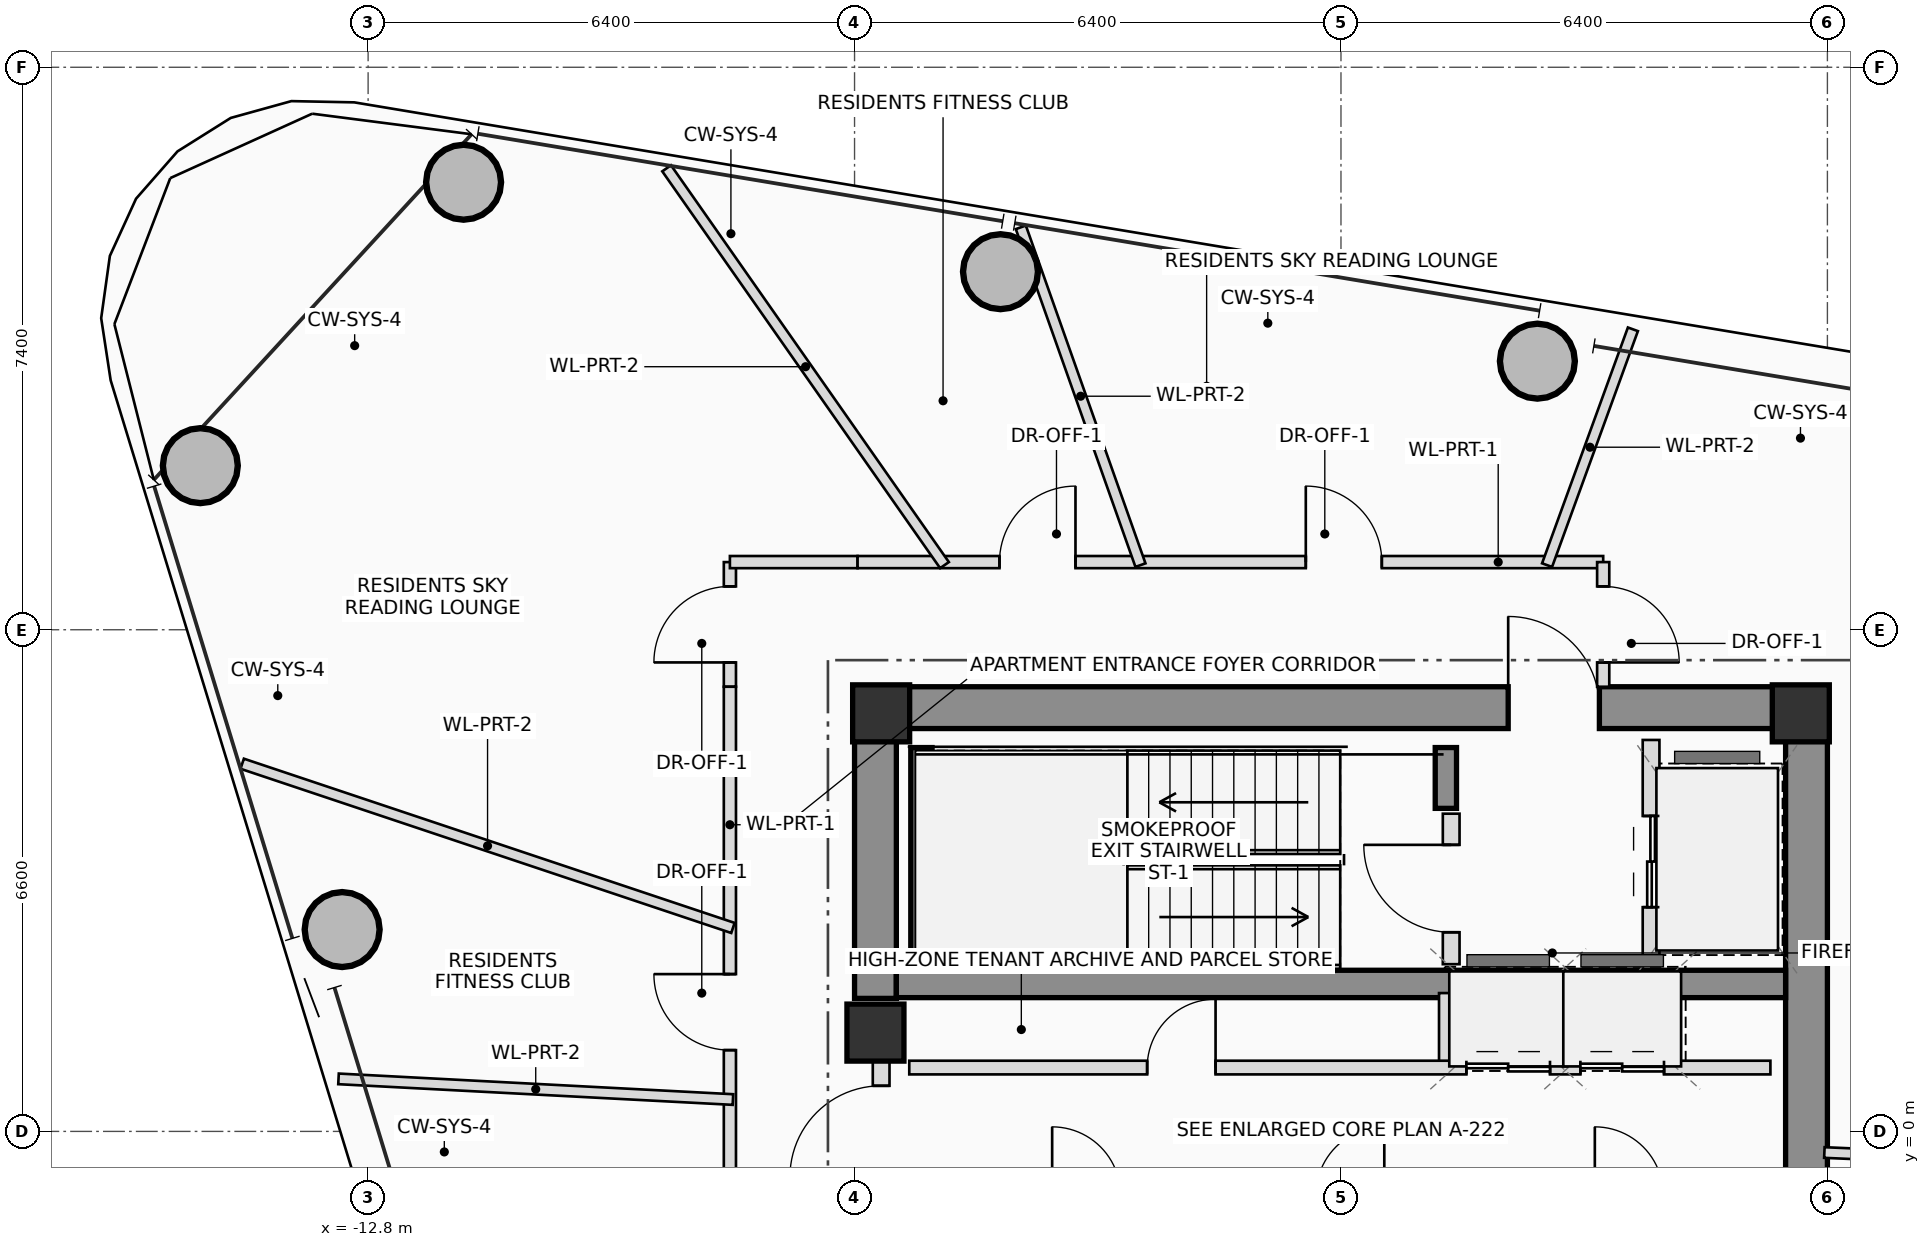
"""IFC4 building model, lengths in metres.
Left out: names, types, materials, properties, quantities, classifications, styles, units other than length and angle.
Written with IfcOpenShell. Run it as: python <this file> out.ifc"""

import sys

from ifc_helpers import new_model, si_unit, direction, frame, frame_2d, origin, origin_2d, place, context, subcontext, project, spatial, rectangle, hollow_circle, extrude, source, transform, mapped, element, fill, save


model = new_model("IFC4")
c1 = context("Model", 3, precision=1e-05, world=origin(), true_north=direction((0.0, 1.0)))
c2 = subcontext(c1, "Body", "Model", "MODEL_VIEW")
j1 = project(units=[si_unit("LENGTHUNIT", "METRE"), si_unit("PLANEANGLEUNIT", "RADIAN")], contexts=[c1])
p1 = place(None, origin())
s1 = spatial("IfcSite", under=j1, at=p1, CompositionType="ELEMENT")
p2 = place(p1, origin())
s2 = spatial("IfcBuilding", under=s1, at=p2, CompositionType="ELEMENT")
p3 = place(p2, frame((0.0, 0.0, 235.45)))
s3 = spatial("IfcBuildingStorey", under=s2, at=p3, CompositionType="ELEMENT", Elevation=235.45)
m1 = source(origin(), c2, "Body", "SweptSolid", [
    extrude(rectangle(XDim=0.75, YDim=0.75, at=origin_2d()), origin(), (0.0, 0.0, 1.0), 3.4),
])
for number, where, z_axis, x_axis in (
    (1, (6.05, 5.5, 0.0), (0.0, 0.0, 1.0), (1.0, 0.0, 0.0)),
    (2, (-6.05, 5.5, 0.0), (0.0, 0.0, 1.0), (1.0, 0.0, 0.0)),
):
    element("IfcColumn", number, at=place(p3, frame(where, z_axis=z_axis, x_axis=x_axis)), inside=s3, PredefinedType="COLUMN", context=c2, shape_type="MappedRepresentation", body=[
        mapped(m1, transform((0.0, 0.0, 0.0), scale=1.0)),
    ])
p4 = place(p3, frame((-6.4, 5.575, 0.0), z_axis=(0.0, 0.0, 1.0), x_axis=(1.0, 0.0, 0.0)))
e3 = element("IfcWall", 3, at=p4, inside=s3, PredefinedType="SHEAR", context=c2, shape_type="SweptSolid", body=[
    extrude(rectangle(XDim=12.8, YDim=0.55, at=frame_2d((6.4, 0.0))), origin(), (0.0, 0.0, 1.0), 3.4),
])
p5 = place(p4, frame((8.6, 0.0, 0.0)))
e4 = element("IfcOpeningElement", 4, at=p5, cuts=e3, PredefinedType="OPENING", context=c2, shape_type="SweptSolid", body=[
    extrude(rectangle(XDim=1.2, YDim=2.2, at=frame_2d((0.6, 1.1))), frame((0.0, 0.285, 0.0), z_axis=(0.0, -1.0, 0.0), x_axis=(1.0, 0.0, 0.0)), (0.0, 0.0, 1.0), 0.57),
])
p6 = place(p3, frame((6.125, -5.3, 0.0), z_axis=(0.0, 0.0, 1.0), x_axis=(0.0, 1.0, 0.0)))
e5 = element("IfcWall", 5, at=p6, inside=s3, PredefinedType="SHEAR", context=c2, shape_type="SweptSolid", body=[
    extrude(rectangle(XDim=10.6, YDim=0.55, at=frame_2d((5.3, 0.0))), origin(), (0.0, 0.0, 1.0), 3.4),
])
p7 = place(p3, frame((-6.125, 1.75, 0.0), z_axis=(0.0, 0.0, 1.0), x_axis=(0.0, 1.0, 0.0)))
e6 = element("IfcWall", 6, at=p7, inside=s3, PredefinedType="SHEAR", context=c2, shape_type="SweptSolid", body=[
    extrude(rectangle(XDim=3.55, YDim=0.55, at=frame_2d((1.775, 0.0))), origin(), (0.0, 0.0, 1.0), 3.4),
])
p8 = place(p3, frame((-5.85, 1.94, 0.0), z_axis=(0.0, 0.0, 1.0), x_axis=(1.0, 0.0, 0.0)))
e7 = element("IfcWall", 7, at=p8, inside=s3, PredefinedType="SHEAR", context=c2, shape_type="SweptSolid", body=[
    extrude(rectangle(XDim=11.7, YDim=0.36, at=frame_2d((5.85, 0.0))), origin(), (0.0, 0.0, 1.0), 3.4),
])
p9 = place(p3, frame((-5.52, 2.3, 0.0), z_axis=(0.0, 0.0, 1.0), x_axis=(0.0, 1.0, 0.0)))
e8 = element("IfcWall", 8, at=p9, inside=s3, PredefinedType="SHEAR", context=c2, shape_type="SweptSolid", body=[
    extrude(rectangle(XDim=2.75, YDim=0.28, at=frame_2d((1.375, 0.0))), origin(), (0.0, 0.0, 1.0), 3.4),
])
p10 = place(p3, frame((1.38, 4.25, 0.0), z_axis=(0.0, 0.0, 1.0), x_axis=(0.0, 1.0, 0.0)))
e9 = element("IfcWall", 9, at=p10, inside=s3, PredefinedType="SHEAR", context=c2, shape_type="SweptSolid", body=[
    extrude(rectangle(XDim=0.8, YDim=0.28, at=frame_2d((0.4, 0.0))), origin(), (0.0, 0.0, 1.0), 3.4),
])
p11 = place(p3, frame((-6.125, 1.3, 0.0), z_axis=(0.0, 0.0, 1.0), x_axis=(1.0, 0.0, 0.0)))
e10 = element("IfcColumn", 10, at=p11, inside=s3, PredefinedType="COLUMN", context=c2, shape_type="MappedRepresentation", body=[
    mapped(m1, transform((0.0, 0.0, 0.0), scale=1.0)),
])
m2 = source(origin(), c2, "Body", "SweptSolid", [
    extrude(hollow_circle(Radius=0.5, WallThickness=0.04, at=origin_2d()), origin(), (0.0, 0.0, 1.0), 3.4),
])
for number, where, z_axis, x_axis in (
    (11, (2.584, 10.134, 0.0), (0.0, 0.0, 1.0), (1.0, 0.0, 0.0)),
    (12, (-4.48, 11.311, 0.0), (0.0, 0.0, 1.0), (1.0, 0.0, 0.0)),
    (13, (-11.544, 12.488, 0.0), (0.0, 0.0, 1.0), (1.0, 0.0, 0.0)),
    (14, (-15.008, 8.759, 0.0), (0.0, 0.0, 1.0), (1.0, 0.0, 0.0)),
    (15, (-13.142, 2.656, 0.0), (0.0, 0.0, 1.0), (1.0, 0.0, 0.0)),
):
    element("IfcColumn", number, at=place(p3, frame(where, z_axis=z_axis, x_axis=x_axis)), inside=s3, PredefinedType="COLUMN", context=c2, shape_type="MappedRepresentation", body=[
        mapped(m2, transform((0.0, 0.0, 0.0), scale=1.0)),
    ])
p12 = place(p3, frame((-6.05, -0.95, 0.0), z_axis=(0.0, 0.0, 1.0), x_axis=(0.0, 1.0, 0.0)))
e16 = element("IfcWall", 16, at=p12, inside=s3, PredefinedType="PLUMBINGWALL", context=c2, shape_type="SweptSolid", body=[
    extrude(rectangle(XDim=1.9, YDim=0.22, at=frame_2d((0.95, 0.0))), origin(), (0.0, 0.0, 1.0), 2.18),
])
p13 = place(p12, frame((0.35, 0.0, 0.0)))
e17 = element("IfcOpeningElement", 17, at=p13, cuts=e16, PredefinedType="OPENING", context=c2, shape_type="SweptSolid", body=[
    extrude(rectangle(XDim=1.2, YDim=2.2, at=frame_2d((0.6, 1.1))), frame((0.0, 0.12, 0.0), z_axis=(0.0, -1.0, 0.0), x_axis=(1.0, 0.0, 0.0)), (0.0, 0.0, 1.0), 0.24),
])
p14 = place(p3, frame((1.45, 2.2, 0.0), z_axis=(0.0, 0.0, 1.0), x_axis=(0.0, 1.0, 0.0)))
e18 = element("IfcWall", 18, at=p14, inside=s3, PredefinedType="PLUMBINGWALL", context=c2, shape_type="SweptSolid", body=[
    extrude(rectangle(XDim=1.98, YDim=0.22, at=frame_2d((0.99, 0.0))), origin(), (0.0, 0.0, 1.0), 3.2),
])
p15 = place(p14, frame((0.42, 0.0, 0.0)))
e19 = element("IfcOpeningElement", 19, at=p15, cuts=e18, PredefinedType="OPENING", context=c2, shape_type="SweptSolid", body=[
    extrude(rectangle(XDim=1.15, YDim=2.15, at=frame_2d((0.575, 1.075))), frame((0.0, 0.12, 0.0), z_axis=(0.0, -1.0, 0.0), x_axis=(1.0, 0.0, 0.0)), (0.0, 0.0, 1.0), 0.24),
])
p16 = place(p3, frame((4.08, 2.2, 0.0), z_axis=(0.0, 0.0, 1.0), x_axis=(0.0, 1.0, 0.0)))
e20 = element("IfcWall", 20, at=p16, inside=s3, PredefinedType="PLUMBINGWALL", context=c2, shape_type="SweptSolid", body=[
    extrude(rectangle(XDim=2.95, YDim=0.22, at=frame_2d((1.475, 0.0))), origin(), (0.0, 0.0, 1.0), 3.2),
])
p17 = place(p16, frame((0.75, 0.0, 0.0)))
e21 = element("IfcOpeningElement", 21, at=p17, cuts=e20, PredefinedType="OPENING", context=c2, shape_type="SweptSolid", body=[
    extrude(rectangle(XDim=1.2, YDim=2.25, at=frame_2d((0.6, 1.125))), frame((0.0, 0.12, 0.0), z_axis=(0.0, -1.0, 0.0), x_axis=(1.0, 0.0, 0.0)), (0.0, 0.0, 1.0), 0.24),
])
for number, where, z_axis, x_axis in (
    (22, (1.38, 0.84, 0.0), (0.0, 0.0, 1.0), (0.0, 1.0, 0.0)),
    (23, (3.02, 0.84, 0.0), (0.0, 0.0, 1.0), (0.0, 1.0, 0.0)),
    (24, (4.38, 0.84, 0.0), (0.0, 0.0, 1.0), (0.0, 1.0, 0.0)),
):
    element("IfcWall", number, at=place(p3, frame(where, z_axis=z_axis, x_axis=x_axis)), inside=s3, PredefinedType="PLUMBINGWALL", context=c2, shape_type="SweptSolid", body=[
        extrude(rectangle(XDim=0.98, YDim=0.18, at=frame_2d((0.49, 0.0))), origin(), (0.0, 0.0, 1.0), 3.2),
    ])
p18 = place(p3, frame((-5.68, 0.84, 0.0), z_axis=(0.0, 0.0, 1.0), x_axis=(1.0, 0.0, 0.0)))
e25 = element("IfcWall", 25, at=p18, inside=s3, PredefinedType="PLUMBINGWALL", context=c2, shape_type="SweptSolid", body=[
    extrude(rectangle(XDim=11.33, YDim=0.18, at=frame_2d((5.665, 0.0))), origin(), (0.0, 0.0, 1.0), 3.2),
])
p19 = place(p18, frame((3.13, 0.0, 0.0)))
e26 = element("IfcOpeningElement", 26, at=p19, cuts=e25, PredefinedType="OPENING", context=c2, shape_type="SweptSolid", body=[
    extrude(rectangle(XDim=0.9, YDim=2.05, at=frame_2d((0.45, 1.025))), frame((0.0, 0.1, 0.0), z_axis=(0.0, -1.0, 0.0), x_axis=(1.0, 0.0, 0.0)), (0.0, 0.0, 1.0), 0.2),
])
p20 = place(p18, frame((7.33, 0.0, 0.0)))
e27 = element("IfcOpeningElement", 27, at=p20, cuts=e25, PredefinedType="OPENING", context=c2, shape_type="SweptSolid", body=[
    extrude(rectangle(XDim=1.1, YDim=2.2, at=frame_2d((0.55, 1.1))), frame((0.0, 0.1, 0.0), z_axis=(0.0, -1.0, 0.0), x_axis=(1.0, 0.0, 0.0)), (0.0, 0.0, 1.0), 0.2),
])
p21 = place(p18, frame((8.83, 0.0, 0.0)))
e28 = element("IfcOpeningElement", 28, at=p21, cuts=e25, PredefinedType="OPENING", context=c2, shape_type="SweptSolid", body=[
    extrude(rectangle(XDim=1.1, YDim=2.2, at=frame_2d((0.55, 1.1))), frame((0.0, 0.1, 0.0), z_axis=(0.0, -1.0, 0.0), x_axis=(1.0, 0.0, 0.0)), (0.0, 0.0, 1.0), 0.2),
])
p22 = place(p3, frame((-8.04, 5.85, 0.0), z_axis=(0.0, 0.0, 1.0), x_axis=(0.0, 1.0, 0.0)))
e29 = element("IfcWall", 29, at=p22, inside=s3, PredefinedType="PARTITIONING", context=c2, shape_type="SweptSolid", body=[
    extrude(rectangle(XDim=1.64, YDim=0.16, at=frame_2d((0.82, 0.0))), origin(), (0.0, 0.0, 1.0), 2.605),
])
p23 = place(p22, frame((0.32, 0.0, 0.0)))
e30 = element("IfcOpeningElement", 30, at=p23, cuts=e29, PredefinedType="OPENING", context=c2, shape_type="SweptSolid", body=[
    extrude(rectangle(XDim=1.0, YDim=2.25, at=frame_2d((0.5, 1.125))), frame((0.0, 0.09, 0.0), z_axis=(0.0, -1.0, 0.0), x_axis=(1.0, 0.0, 0.0)), (0.0, 0.0, 1.0), 0.18),
])
p24 = place(p3, frame((-8.04, 7.49, 0.0), z_axis=(0.0, 0.0, 1.0), x_axis=(1.0, 0.0, 0.0)))
e31 = element("IfcWall", 31, at=p24, inside=s3, PredefinedType="PARTITIONING", context=c2, shape_type="SweptSolid", body=[
    extrude(rectangle(XDim=1.68, YDim=0.16, at=frame_2d((0.84, 0.0))), origin(), (0.0, 0.0, 1.0), 2.605),
])
p25 = place(p3, frame((-6.36, 7.49, 0.0), z_axis=(0.0, 0.0, 1.0), x_axis=(1.0, 0.0, 0.0)))
e32 = element("IfcWall", 32, at=p25, inside=s3, PredefinedType="PARTITIONING", context=c2, shape_type="SweptSolid", body=[
    extrude(rectangle(XDim=9.81, YDim=0.16, at=frame_2d((4.905, 0.0))), origin(), (0.0, 0.0, 1.0), 2.605),
])
p26 = place(p25, frame((1.867, 0.0, 0.0)))
e33 = element("IfcOpeningElement", 33, at=p26, cuts=e32, PredefinedType="OPENING", context=c2, shape_type="SweptSolid", body=[
    extrude(rectangle(XDim=1.0, YDim=2.25, at=frame_2d((0.5, 1.125))), frame((0.0, 0.09, 0.0), z_axis=(0.0, -1.0, 0.0), x_axis=(1.0, 0.0, 0.0)), (0.0, 0.0, 1.0), 0.18),
])
p27 = place(p25, frame((5.897, 0.0, 0.0)))
e34 = element("IfcOpeningElement", 34, at=p27, cuts=e32, PredefinedType="OPENING", context=c2, shape_type="SweptSolid", body=[
    extrude(rectangle(XDim=1.0, YDim=2.25, at=frame_2d((0.5, 1.125))), frame((0.0, 0.09, 0.0), z_axis=(0.0, -1.0, 0.0), x_axis=(1.0, 0.0, 0.0)), (0.0, 0.0, 1.0), 0.18),
])
p28 = place(p3, frame((3.45, 7.49, 0.0), z_axis=(0.0, 0.0, 1.0), x_axis=(0.0, -1.0, 0.0)))
e35 = element("IfcWall", 35, at=p28, inside=s3, PredefinedType="PARTITIONING", context=c2, shape_type="SweptSolid", body=[
    extrude(rectangle(XDim=1.64, YDim=0.16, at=frame_2d((0.82, 0.0))), origin(), (0.0, 0.0, 1.0), 3.2),
])
p29 = place(p28, frame((0.32, 0.0, 0.0)))
e36 = element("IfcOpeningElement", 36, at=p29, cuts=e35, PredefinedType="OPENING", context=c2, shape_type="SweptSolid", body=[
    extrude(rectangle(XDim=1.0, YDim=2.25, at=frame_2d((0.5, 1.125))), frame((0.0, 0.09, 0.0), z_axis=(0.0, -1.0, 0.0), x_axis=(1.0, 0.0, 0.0)), (0.0, 0.0, 1.0), 0.18),
])
p30 = place(p3, frame((-8.04, -5.85, 0.0), z_axis=(0.0, 0.0, 1.0), x_axis=(0.0, 1.0, 0.0)))
e37 = element("IfcWall", 37, at=p30, inside=s3, PredefinedType="PARTITIONING", context=c2, shape_type="SweptSolid", body=[
    extrude(rectangle(XDim=11.7, YDim=0.16, at=frame_2d((5.85, 0.0))), origin(), (0.0, 0.0, 1.0), 2.605),
])
p31 = place(p30, frame((2.977, 0.0, 0.0)))
e38 = element("IfcOpeningElement", 38, at=p31, cuts=e37, PredefinedType="OPENING", context=c2, shape_type="SweptSolid", body=[
    extrude(rectangle(XDim=1.0, YDim=2.25, at=frame_2d((0.5, 1.125))), frame((0.0, 0.09, 0.0), z_axis=(0.0, -1.0, 0.0), x_axis=(1.0, 0.0, 0.0)), (0.0, 0.0, 1.0), 0.18),
])
p32 = place(p30, frame((6.919, 0.0, 0.0)))
e39 = element("IfcOpeningElement", 39, at=p32, cuts=e37, PredefinedType="OPENING", context=c2, shape_type="SweptSolid", body=[
    extrude(rectangle(XDim=1.0, YDim=2.25, at=frame_2d((0.5, 1.125))), frame((0.0, 0.09, 0.0), z_axis=(0.0, -1.0, 0.0), x_axis=(1.0, 0.0, 0.0)), (0.0, 0.0, 1.0), 0.18),
])
p33 = place(p3, frame((6.36, -0.278, 0.0), z_axis=(0.0, 0.0, 1.0), x_axis=(0.99904773846, -0.043630451279, 0.0)))
e40 = element("IfcWall", 40, at=p33, inside=s3, PredefinedType="PARTITIONING", context=c2, shape_type="SweptSolid", body=[
    extrude(rectangle(XDim=8.992, YDim=0.14, at=frame_2d((4.496, 0.0))), origin(), (0.0, 0.0, 1.0), 2.605),
])
p34 = place(p3, frame((2.712, 7.45, 0.0), z_axis=(0.0, 0.0, 1.0), x_axis=(0.341974588874, 0.9397092, 0.0)))
e41 = element("IfcWall", 41, at=p34, inside=s3, PredefinedType="PARTITIONING", context=c2, shape_type="SweptSolid", body=[
    extrude(rectangle(XDim=3.302, YDim=0.14, at=frame_2d((1.651, 0.0))), origin(), (0.0, 0.0, 1.0), 2.605),
])
p35 = place(p3, frame((-2.638, 7.45, 0.0), z_axis=(0.0, 0.0, 1.0), x_axis=(-0.333819345572, 0.942637069355, 0.0)))
e42 = element("IfcWall", 42, at=p35, inside=s3, PredefinedType="PARTITIONING", context=c2, shape_type="SweptSolid", body=[
    extrude(rectangle(XDim=4.715, YDim=0.14, at=frame_2d((2.357, 0.0))), origin(), (0.0, 0.0, 1.0), 2.765),
])
p36 = place(p3, frame((-5.217, 7.45, 0.0), z_axis=(0.0, 0.0, 1.0), x_axis=(-0.573578024676, 0.819150932129, 0.0)))
e43 = element("IfcWall", 43, at=p36, inside=s3, PredefinedType="PARTITIONING", context=c2, shape_type="SweptSolid", body=[
    extrude(rectangle(XDim=6.374, YDim=0.14, at=frame_2d((3.187, 0.0))), origin(), (0.0, 0.0, 1.0), 2.605),
])
p37 = place(p3, frame((-8.0, 2.677, 0.0), z_axis=(0.0, 0.0, 1.0), x_axis=(-0.948324112853, 0.317303288639, 0.0)))
e44 = element("IfcWall", 44, at=p37, inside=s3, PredefinedType="PARTITIONING", context=c2, shape_type="SweptSolid", body=[
    extrude(rectangle(XDim=6.809, YDim=0.14, at=frame_2d((3.404, 0.0))), origin(), (0.0, 0.0, 1.0), 2.605),
])
p38 = place(p3, frame((-8.0, 0.419, 0.0), z_axis=(0.0, 0.0, 1.0), x_axis=(-0.998629485047, 0.052336904702, 0.0)))
e45 = element("IfcWall", 45, at=p38, inside=s3, PredefinedType="PARTITIONING", context=c2, shape_type="SweptSolid", body=[
    extrude(rectangle(XDim=5.197, YDim=0.14, at=frame_2d((2.598, 0.0))), origin(), (0.0, 0.0, 1.0), 2.765),
])
p39 = place(p5, origin())
e46 = element("IfcDoor", 46, at=p39, inside=s3, OperationType="SINGLE_SWING_LEFT", PredefinedType="DOOR", context=c2, shape_type="SweptSolid", body=[
    extrude(rectangle(XDim=1.2, YDim=2.2, at=frame_2d((0.6, 1.1))), frame((0.0, 0.025, 0.0), z_axis=(0.0, -1.0, 0.0), x_axis=(1.0, 0.0, 0.0)), (0.0, 0.0, 1.0), 0.05),
])
fill(e4, e46)
p40 = place(p13, origin())
e47 = element("IfcDoor", 47, at=p40, inside=s3, OperationType="SINGLE_SWING_LEFT", PredefinedType="DOOR", context=c2, shape_type="SweptSolid", body=[
    extrude(rectangle(XDim=1.2, YDim=2.2, at=frame_2d((0.6, 1.1))), frame((0.0, 0.025, 0.0), z_axis=(0.0, -1.0, 0.0), x_axis=(1.0, 0.0, 0.0)), (0.0, 0.0, 1.0), 0.05),
])
fill(e17, e47)
p41 = place(p15, origin())
e48 = element("IfcDoor", 48, at=p41, inside=s3, OperationType="SINGLE_SWING_RIGHT", PredefinedType="DOOR", context=c2, shape_type="SweptSolid", body=[
    extrude(rectangle(XDim=1.15, YDim=2.15, at=frame_2d((0.575, 1.075))), frame((0.0, 0.025, 0.0), z_axis=(0.0, -1.0, 0.0), x_axis=(1.0, 0.0, 0.0)), (0.0, 0.0, 1.0), 0.05),
])
fill(e19, e48)
p42 = place(p17, origin())
e49 = element("IfcDoor", 49, at=p42, inside=s3, OperationType="DOUBLE_DOOR_SLIDING", PredefinedType="DOOR", context=c2, shape_type="SweptSolid", body=[
    extrude(rectangle(XDim=1.2, YDim=2.25, at=frame_2d((0.6, 1.125))), frame((0.0, 0.025, 0.0), z_axis=(0.0, -1.0, 0.0), x_axis=(1.0, 0.0, 0.0)), (0.0, 0.0, 1.0), 0.05),
])
fill(e21, e49)
p43 = place(p19, origin())
e50 = element("IfcDoor", 50, at=p43, inside=s3, OperationType="SINGLE_SWING_RIGHT", PredefinedType="DOOR", context=c2, shape_type="SweptSolid", body=[
    extrude(rectangle(XDim=0.9, YDim=2.05, at=frame_2d((0.45, 1.025))), frame((0.0, 0.025, 0.0), z_axis=(0.0, -1.0, 0.0), x_axis=(1.0, 0.0, 0.0)), (0.0, 0.0, 1.0), 0.05),
])
fill(e26, e50)
p44 = place(p20, origin())
e51 = element("IfcDoor", 51, at=p44, inside=s3, OperationType="DOUBLE_DOOR_SLIDING", PredefinedType="DOOR", context=c2, shape_type="SweptSolid", body=[
    extrude(rectangle(XDim=1.1, YDim=2.2, at=frame_2d((0.55, 1.1))), frame((0.0, 0.025, 0.0), z_axis=(0.0, -1.0, 0.0), x_axis=(1.0, 0.0, 0.0)), (0.0, 0.0, 1.0), 0.05),
])
fill(e27, e51)
p45 = place(p21, origin())
e52 = element("IfcDoor", 52, at=p45, inside=s3, OperationType="DOUBLE_DOOR_SLIDING", PredefinedType="DOOR", context=c2, shape_type="SweptSolid", body=[
    extrude(rectangle(XDim=1.1, YDim=2.2, at=frame_2d((0.55, 1.1))), frame((0.0, 0.025, 0.0), z_axis=(0.0, -1.0, 0.0), x_axis=(1.0, 0.0, 0.0)), (0.0, 0.0, 1.0), 0.05),
])
fill(e28, e52)
p46 = place(p23, origin())
e53 = element("IfcDoor", 53, at=p46, inside=s3, OperationType="SINGLE_SWING_LEFT", PredefinedType="DOOR", context=c2, shape_type="SweptSolid", body=[
    extrude(rectangle(XDim=1.0, YDim=2.25, at=frame_2d((0.5, 1.125))), frame((0.0, 0.025, 0.0), z_axis=(0.0, -1.0, 0.0), x_axis=(1.0, 0.0, 0.0)), (0.0, 0.0, 1.0), 0.05),
])
fill(e30, e53)
p47 = place(p26, origin())
e54 = element("IfcDoor", 54, at=p47, inside=s3, OperationType="SINGLE_SWING_RIGHT", PredefinedType="DOOR", context=c2, shape_type="SweptSolid", body=[
    extrude(rectangle(XDim=1.0, YDim=2.25, at=frame_2d((0.5, 1.125))), frame((0.0, 0.025, 0.0), z_axis=(0.0, -1.0, 0.0), x_axis=(1.0, 0.0, 0.0)), (0.0, 0.0, 1.0), 0.05),
])
fill(e33, e54)
p48 = place(p27, origin())
e55 = element("IfcDoor", 55, at=p48, inside=s3, OperationType="SINGLE_SWING_LEFT", PredefinedType="DOOR", context=c2, shape_type="SweptSolid", body=[
    extrude(rectangle(XDim=1.0, YDim=2.25, at=frame_2d((0.5, 1.125))), frame((0.0, 0.025, 0.0), z_axis=(0.0, -1.0, 0.0), x_axis=(1.0, 0.0, 0.0)), (0.0, 0.0, 1.0), 0.05),
])
fill(e34, e55)
p49 = place(p29, origin())
e56 = element("IfcDoor", 56, at=p49, inside=s3, OperationType="SINGLE_SWING_RIGHT", PredefinedType="DOOR", context=c2, shape_type="SweptSolid", body=[
    extrude(rectangle(XDim=1.0, YDim=2.25, at=frame_2d((0.5, 1.125))), frame((0.0, 0.025, 0.0), z_axis=(0.0, -1.0, 0.0), x_axis=(1.0, 0.0, 0.0)), (0.0, 0.0, 1.0), 0.05),
])
fill(e36, e56)
p50 = place(p32, origin())
e57 = element("IfcDoor", 57, at=p50, inside=s3, OperationType="SINGLE_SWING_RIGHT", PredefinedType="DOOR", context=c2, shape_type="SweptSolid", body=[
    extrude(rectangle(XDim=1.0, YDim=2.25, at=frame_2d((0.5, 1.125))), frame((0.0, 0.025, 0.0), z_axis=(0.0, -1.0, 0.0), x_axis=(1.0, 0.0, 0.0)), (0.0, 0.0, 1.0), 0.05),
])
fill(e39, e57)
save(model, sys.argv[1])
